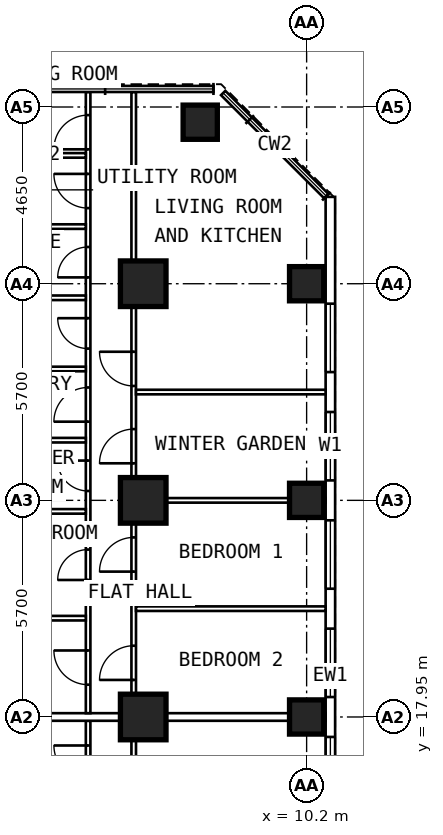
"""IFC4 building model, lengths in metres.
Left out: names, types, materials, properties, quantities, classifications, styles, units other than length and angle.
Written with IfcOpenShell. Run it as: python <this file> out.ifc"""

import sys

from ifc_helpers import new_model, si_unit, direction, frame, frame_2d, origin, origin_2d, place, context, subcontext, project, spatial, rectangle, extrude, element, fill, save


model = new_model("IFC4")
c1 = context("Model", 3, precision=1e-05, world=origin(), true_north=direction((0.0, 1.0)))
c2 = subcontext(c1, "Body", "Model", "MODEL_VIEW")
j1 = project(units=[si_unit("LENGTHUNIT", "METRE"), si_unit("PLANEANGLEUNIT", "RADIAN")], contexts=[c1])
p1 = place(None, origin())
s1 = spatial("IfcSite", under=j1, at=p1, CompositionType="ELEMENT")
p2 = place(p1, origin())
s2 = spatial("IfcBuilding", under=s1, at=p2, CompositionType="ELEMENT")
p3 = place(p2, frame((0.0, 0.0, 102.4)))
s3 = spatial("IfcBuildingStorey", under=s2, at=p3, CompositionType="ELEMENT", Elevation=102.4)
for number, where, z_axis, x_axis in (
    (1, (10.2, 17.95, 0.0), (0.0, 0.0, 1.0), (0.0, 1.0, 0.0)),
    (2, (10.2, 23.65, 0.0), (0.0, 0.0, 1.0), (0.0, 1.0, 0.0)),
    (3, (10.2, 29.35, 0.0), (0.0, 0.0, 1.0), (0.0, 1.0, 0.0)),
    (4, (7.4, 33.6, 0.0), (0.0, 0.0, 1.0), (0.0, 1.0, 0.0)),
):
    element("IfcColumn", number, at=place(p3, frame(where, z_axis=z_axis, x_axis=x_axis)), inside=s3, PredefinedType="COLUMN", context=c2, shape_type="SweptSolid", body=[
        extrude(rectangle(XDim=0.9, YDim=0.9, at=origin_2d()), origin(), (0.0, 0.0, 1.0), 3.6),
    ])
for number, where, z_axis, x_axis in (
    (5, (5.9, 17.95, 0.0), (0.0, 0.0, 1.0), (0.0, 1.0, 0.0)),
    (6, (5.9, 23.65, 0.0), (0.0, 0.0, 1.0), (0.0, 1.0, 0.0)),
    (7, (5.9, 29.35, 0.0), (0.0, 0.0, 1.0), (0.0, 1.0, 0.0)),
):
    element("IfcColumn", number, at=place(p3, frame(where, z_axis=z_axis, x_axis=x_axis)), inside=s3, PredefinedType="COLUMN", context=c2, shape_type="SweptSolid", body=[
        extrude(rectangle(XDim=1.2, YDim=1.2, at=origin_2d()), origin(), (0.0, 0.0, 1.0), 3.6),
    ])
p4 = place(p3, frame((10.825, 6.409, 0.0), z_axis=(0.0, 0.0, 1.0), x_axis=(0.0, 1.0, 0.0)))
e8 = element("IfcWall", 8, at=p4, inside=s3, PredefinedType="SOLIDWALL", context=c2, shape_type="SweptSolid", body=[
    extrude(rectangle(XDim=25.226, YDim=0.25, at=frame_2d((12.613, 0.0))), origin(), (0.0, 0.0, 1.0), 3.35),
])
p5 = place(p4, frame((0.666, 0.0, 0.8)))
e9 = element("IfcOpeningElement", 9, at=p5, cuts=e8, PredefinedType="OPENING", context=c2, shape_type="SweptSolid", body=[
    extrude(rectangle(XDim=1.8, YDim=1.8, at=frame_2d((0.9, 0.9))), frame((0.0, 0.137, 0.0), z_axis=(0.0, -1.0, 0.0), x_axis=(1.0, 0.0, 0.0)), (0.0, 0.0, 1.0), 0.274),
])
p6 = place(p4, frame((3.516, 0.0, 0.8)))
e10 = element("IfcOpeningElement", 10, at=p6, cuts=e8, PredefinedType="OPENING", context=c2, shape_type="SweptSolid", body=[
    extrude(rectangle(XDim=1.8, YDim=1.8, at=frame_2d((0.9, 0.9))), frame((0.0, 0.137, 0.0), z_axis=(0.0, -1.0, 0.0), x_axis=(1.0, 0.0, 0.0)), (0.0, 0.0, 1.0), 0.274),
])
p7 = place(p4, frame((6.366, 0.0, 0.8)))
e11 = element("IfcOpeningElement", 11, at=p7, cuts=e8, PredefinedType="OPENING", context=c2, shape_type="SweptSolid", body=[
    extrude(rectangle(XDim=1.8, YDim=1.8, at=frame_2d((0.9, 0.9))), frame((0.0, 0.137, 0.0), z_axis=(0.0, -1.0, 0.0), x_axis=(1.0, 0.0, 0.0)), (0.0, 0.0, 1.0), 0.274),
])
p8 = place(p4, frame((9.216, 0.0, 0.8)))
e12 = element("IfcOpeningElement", 12, at=p8, cuts=e8, PredefinedType="OPENING", context=c2, shape_type="SweptSolid", body=[
    extrude(rectangle(XDim=1.8, YDim=1.8, at=frame_2d((0.9, 0.9))), frame((0.0, 0.137, 0.0), z_axis=(0.0, -1.0, 0.0), x_axis=(1.0, 0.0, 0.0)), (0.0, 0.0, 1.0), 0.274),
])
p9 = place(p4, frame((12.066, 0.0, 0.8)))
e13 = element("IfcOpeningElement", 13, at=p9, cuts=e8, PredefinedType="OPENING", context=c2, shape_type="SweptSolid", body=[
    extrude(rectangle(XDim=1.8, YDim=1.8, at=frame_2d((0.9, 0.9))), frame((0.0, 0.137, 0.0), z_axis=(0.0, -1.0, 0.0), x_axis=(1.0, 0.0, 0.0)), (0.0, 0.0, 1.0), 0.274),
])
p10 = place(p4, frame((14.916, 0.0, 0.8)))
e14 = element("IfcOpeningElement", 14, at=p10, cuts=e8, PredefinedType="OPENING", context=c2, shape_type="SweptSolid", body=[
    extrude(rectangle(XDim=1.8, YDim=1.8, at=frame_2d((0.9, 0.9))), frame((0.0, 0.137, 0.0), z_axis=(0.0, -1.0, 0.0), x_axis=(1.0, 0.0, 0.0)), (0.0, 0.0, 1.0), 0.274),
])
p11 = place(p4, frame((17.766, 0.0, 0.8)))
e15 = element("IfcOpeningElement", 15, at=p11, cuts=e8, PredefinedType="OPENING", context=c2, shape_type="SweptSolid", body=[
    extrude(rectangle(XDim=1.8, YDim=1.8, at=frame_2d((0.9, 0.9))), frame((0.0, 0.137, 0.0), z_axis=(0.0, -1.0, 0.0), x_axis=(1.0, 0.0, 0.0)), (0.0, 0.0, 1.0), 0.274),
])
p12 = place(p4, frame((20.616, 0.0, 0.8)))
e16 = element("IfcOpeningElement", 16, at=p12, cuts=e8, PredefinedType="OPENING", context=c2, shape_type="SweptSolid", body=[
    extrude(rectangle(XDim=1.8, YDim=1.8, at=frame_2d((0.9, 0.9))), frame((0.0, 0.137, 0.0), z_axis=(0.0, -1.0, 0.0), x_axis=(1.0, 0.0, 0.0)), (0.0, 0.0, 1.0), 0.274),
])
p13 = place(p3, frame((4.45, 10.1, 0.0), z_axis=(0.0, 0.0, 1.0), x_axis=(0.0, 1.0, 0.0)))
e17 = element("IfcWall", 17, at=p13, inside=s3, PredefinedType="PARTITIONING", context=c2, shape_type="SweptSolid", body=[
    extrude(rectangle(XDim=7.75, YDim=0.12, at=frame_2d((3.875, 0.0))), origin(), (0.0, 0.0, 1.0), 3.35),
])
p14 = place(p13, frame((0.56, 0.0, 0.0)))
e18 = element("IfcOpeningElement", 18, at=p14, cuts=e17, PredefinedType="OPENING", context=c2, shape_type="SweptSolid", body=[
    extrude(rectangle(XDim=0.9, YDim=2.1, at=frame_2d((0.45, 1.05))), frame((0.0, 0.072, 0.0), z_axis=(0.0, -1.0, 0.0), x_axis=(1.0, 0.0, 0.0)), (0.0, 0.0, 1.0), 0.144),
])
p15 = place(p13, frame((3.385, 0.0, 0.0)))
e19 = element("IfcOpeningElement", 19, at=p15, cuts=e17, PredefinedType="OPENING", context=c2, shape_type="SweptSolid", body=[
    extrude(rectangle(XDim=0.8, YDim=2.1, at=frame_2d((0.4, 1.05))), frame((0.0, 0.072, 0.0), z_axis=(0.0, -1.0, 0.0), x_axis=(1.0, 0.0, 0.0)), (0.0, 0.0, 1.0), 0.144),
])
p16 = place(p13, frame((6.2, 0.0, 0.0)))
e20 = element("IfcOpeningElement", 20, at=p16, cuts=e17, PredefinedType="OPENING", context=c2, shape_type="SweptSolid", body=[
    extrude(rectangle(XDim=0.9, YDim=2.1, at=frame_2d((0.45, 1.05))), frame((0.0, 0.072, 0.0), z_axis=(0.0, -1.0, 0.0), x_axis=(1.0, 0.0, 0.0)), (0.0, 0.0, 1.0), 0.144),
])
p17 = place(p3, frame((5.65, 9.6, 0.0), z_axis=(0.0, 0.0, 1.0), x_axis=(0.0, 1.0, 0.0)))
e21 = element("IfcWall", 21, at=p17, inside=s3, PredefinedType="PARTITIONING", context=c2, shape_type="SweptSolid", body=[
    extrude(rectangle(XDim=8.1, YDim=0.12, at=frame_2d((4.05, 0.0))), origin(), (0.0, 0.0, 1.0), 3.35),
])
p18 = place(p17, frame((5.05, 0.0, 0.0)))
e22 = element("IfcOpeningElement", 22, at=p18, cuts=e21, PredefinedType="OPENING", context=c2, shape_type="SweptSolid", body=[
    extrude(rectangle(XDim=0.9, YDim=2.1, at=frame_2d((0.45, 1.05))), frame((0.0, 0.072, 0.0), z_axis=(0.0, -1.0, 0.0), x_axis=(1.0, 0.0, 0.0)), (0.0, 0.0, 1.0), 0.144),
])
p19 = place(p3, frame((4.45, 18.05, 0.0), z_axis=(0.0, 0.0, 1.0), x_axis=(0.0, 1.0, 0.0)))
e23 = element("IfcWall", 23, at=p19, inside=s3, PredefinedType="PARTITIONING", context=c2, shape_type="SweptSolid", body=[
    extrude(rectangle(XDim=16.345, YDim=0.12, at=frame_2d((8.172, 0.0))), origin(), (0.0, 0.0, 1.0), 3.35),
])
p20 = place(p19, frame((0.75, 0.0, 0.0)))
e24 = element("IfcOpeningElement", 24, at=p20, cuts=e23, PredefinedType="OPENING", context=c2, shape_type="SweptSolid", body=[
    extrude(rectangle(XDim=0.9, YDim=2.1, at=frame_2d((0.45, 1.05))), frame((0.0, 0.072, 0.0), z_axis=(0.0, -1.0, 0.0), x_axis=(1.0, 0.0, 0.0)), (0.0, 0.0, 1.0), 0.144),
])
p21 = place(p19, frame((3.505, 0.0, 0.0)))
e25 = element("IfcOpeningElement", 25, at=p21, cuts=e23, PredefinedType="OPENING", context=c2, shape_type="SweptSolid", body=[
    extrude(rectangle(XDim=0.8, YDim=2.1, at=frame_2d((0.4, 1.05))), frame((0.0, 0.072, 0.0), z_axis=(0.0, -1.0, 0.0), x_axis=(1.0, 0.0, 0.0)), (0.0, 0.0, 1.0), 0.144),
])
p22 = place(p19, frame((5.847, 0.0, 0.0)))
e26 = element("IfcOpeningElement", 26, at=p22, cuts=e23, PredefinedType="OPENING", context=c2, shape_type="SweptSolid", body=[
    extrude(rectangle(XDim=0.8, YDim=2.1, at=frame_2d((0.4, 1.05))), frame((0.0, 0.072, 0.0), z_axis=(0.0, -1.0, 0.0), x_axis=(1.0, 0.0, 0.0)), (0.0, 0.0, 1.0), 0.144),
])
p23 = place(p19, frame((7.67, 0.0, 0.0)))
e27 = element("IfcOpeningElement", 27, at=p23, cuts=e23, PredefinedType="OPENING", context=c2, shape_type="SweptSolid", body=[
    extrude(rectangle(XDim=0.9, YDim=2.1, at=frame_2d((0.45, 1.05))), frame((0.0, 0.072, 0.0), z_axis=(0.0, -1.0, 0.0), x_axis=(1.0, 0.0, 0.0)), (0.0, 0.0, 1.0), 0.144),
])
p24 = place(p19, frame((9.593, 0.0, 0.0)))
e28 = element("IfcOpeningElement", 28, at=p24, cuts=e23, PredefinedType="OPENING", context=c2, shape_type="SweptSolid", body=[
    extrude(rectangle(XDim=0.8, YDim=2.1, at=frame_2d((0.4, 1.05))), frame((0.0, 0.072, 0.0), z_axis=(0.0, -1.0, 0.0), x_axis=(1.0, 0.0, 0.0)), (0.0, 0.0, 1.0), 0.144),
])
p25 = place(p19, frame((11.467, 0.0, 0.0)))
e29 = element("IfcOpeningElement", 29, at=p25, cuts=e23, PredefinedType="OPENING", context=c2, shape_type="SweptSolid", body=[
    extrude(rectangle(XDim=0.8, YDim=2.1, at=frame_2d((0.4, 1.05))), frame((0.0, 0.072, 0.0), z_axis=(0.0, -1.0, 0.0), x_axis=(1.0, 0.0, 0.0)), (0.0, 0.0, 1.0), 0.144),
])
p26 = place(p19, frame((13.29, 0.0, 0.0)))
e30 = element("IfcOpeningElement", 30, at=p26, cuts=e23, PredefinedType="OPENING", context=c2, shape_type="SweptSolid", body=[
    extrude(rectangle(XDim=0.9, YDim=2.1, at=frame_2d((0.45, 1.05))), frame((0.0, 0.072, 0.0), z_axis=(0.0, -1.0, 0.0), x_axis=(1.0, 0.0, 0.0)), (0.0, 0.0, 1.0), 0.144),
])
p27 = place(p19, frame((14.837, 0.0, 0.0)))
e31 = element("IfcOpeningElement", 31, at=p27, cuts=e23, PredefinedType="OPENING", context=c2, shape_type="SweptSolid", body=[
    extrude(rectangle(XDim=0.9, YDim=2.1, at=frame_2d((0.45, 1.05))), frame((0.0, 0.072, 0.0), z_axis=(0.0, -1.0, 0.0), x_axis=(1.0, 0.0, 0.0)), (0.0, 0.0, 1.0), 0.144),
])
p28 = place(p3, frame((5.65, 18.05, 0.0), z_axis=(0.0, 0.0, 1.0), x_axis=(0.0, 1.0, 0.0)))
e32 = element("IfcWall", 32, at=p28, inside=s3, PredefinedType="PARTITIONING", context=c2, shape_type="SweptSolid", body=[
    extrude(rectangle(XDim=16.345, YDim=0.12, at=frame_2d((8.172, 0.0))), origin(), (0.0, 0.0, 1.0), 3.35),
])
p29 = place(p28, frame((0.875, 0.0, 0.0)))
e33 = element("IfcOpeningElement", 33, at=p29, cuts=e32, PredefinedType="OPENING", context=c2, shape_type="SweptSolid", body=[
    extrude(rectangle(XDim=0.9, YDim=2.1, at=frame_2d((0.45, 1.05))), frame((0.0, 0.072, 0.0), z_axis=(0.0, -1.0, 0.0), x_axis=(1.0, 0.0, 0.0)), (0.0, 0.0, 1.0), 0.144),
])
p30 = place(p28, frame((3.725, 0.0, 0.0)))
e34 = element("IfcOpeningElement", 34, at=p30, cuts=e32, PredefinedType="OPENING", context=c2, shape_type="SweptSolid", body=[
    extrude(rectangle(XDim=0.9, YDim=2.1, at=frame_2d((0.45, 1.05))), frame((0.0, 0.072, 0.0), z_axis=(0.0, -1.0, 0.0), x_axis=(1.0, 0.0, 0.0)), (0.0, 0.0, 1.0), 0.144),
])
p31 = place(p28, frame((6.575, 0.0, 0.0)))
e35 = element("IfcOpeningElement", 35, at=p31, cuts=e32, PredefinedType="OPENING", context=c2, shape_type="SweptSolid", body=[
    extrude(rectangle(XDim=0.9, YDim=2.1, at=frame_2d((0.45, 1.05))), frame((0.0, 0.072, 0.0), z_axis=(0.0, -1.0, 0.0), x_axis=(1.0, 0.0, 0.0)), (0.0, 0.0, 1.0), 0.144),
])
p32 = place(p28, frame((8.61, 0.0, 0.0)))
e36 = element("IfcOpeningElement", 36, at=p32, cuts=e32, PredefinedType="OPENING", context=c2, shape_type="SweptSolid", body=[
    extrude(rectangle(XDim=0.9, YDim=2.1, at=frame_2d((0.45, 1.05))), frame((0.0, 0.072, 0.0), z_axis=(0.0, -1.0, 0.0), x_axis=(1.0, 0.0, 0.0)), (0.0, 0.0, 1.0), 0.144),
])
p33 = place(p3, frame((5.71, 20.8, 0.0), z_axis=(0.0, 0.0, 1.0), x_axis=(1.0, 0.0, 0.0)))
e37 = element("IfcWall", 37, at=p33, inside=s3, PredefinedType="PARTITIONING", context=c2, shape_type="SweptSolid", body=[
    extrude(rectangle(XDim=4.99, YDim=0.12, at=frame_2d((2.495, 0.0))), origin(), (0.0, 0.0, 1.0), 3.35),
])
p34 = place(p3, frame((5.71, 23.65, 0.0), z_axis=(0.0, 0.0, 1.0), x_axis=(1.0, 0.0, 0.0)))
e38 = element("IfcWall", 38, at=p34, inside=s3, PredefinedType="PARTITIONING", context=c2, shape_type="SweptSolid", body=[
    extrude(rectangle(XDim=4.99, YDim=0.12, at=frame_2d((2.495, 0.0))), origin(), (0.0, 0.0, 1.0), 2.45),
])
p35 = place(p3, frame((5.71, 26.5, 0.0), z_axis=(0.0, 0.0, 1.0), x_axis=(1.0, 0.0, 0.0)))
e39 = element("IfcWall", 39, at=p35, inside=s3, PredefinedType="PARTITIONING", context=c2, shape_type="SweptSolid", body=[
    extrude(rectangle(XDim=4.99, YDim=0.12, at=frame_2d((2.495, 0.0))), origin(), (0.0, 0.0, 1.0), 3.35),
])
p36 = place(p3, frame((2.1, 20.55, 0.0), z_axis=(0.0, 0.0, 1.0), x_axis=(1.0, 0.0, 0.0)))
e40 = element("IfcWall", 40, at=p36, inside=s3, PredefinedType="PARTITIONING", context=c2, shape_type="SweptSolid", body=[
    extrude(rectangle(XDim=2.29, YDim=0.12, at=frame_2d((1.145, 0.0))), origin(), (0.0, 0.0, 1.0), 3.35),
])
p37 = place(p3, frame((2.1, 23.36, 0.0), z_axis=(0.0, 0.0, 1.0), x_axis=(1.0, 0.0, 0.0)))
e41 = element("IfcWall", 41, at=p37, inside=s3, PredefinedType="PARTITIONING", context=c2, shape_type="SweptSolid", body=[
    extrude(rectangle(XDim=2.29, YDim=0.12, at=frame_2d((1.145, 0.0))), origin(), (0.0, 0.0, 1.0), 2.45),
])
for number, where, z_axis, x_axis in (
    (42, (2.1, 25.233, 0.0), (0.0, 0.0, 1.0), (1.0, 0.0, 0.0)),
    (43, (2.1, 27.107, 0.0), (0.0, 0.0, 1.0), (1.0, 0.0, 0.0)),
):
    element("IfcWall", number, at=place(p3, frame(where, z_axis=z_axis, x_axis=x_axis)), inside=s3, PredefinedType="PARTITIONING", context=c2, shape_type="SweptSolid", body=[
        extrude(rectangle(XDim=2.29, YDim=0.12, at=frame_2d((1.145, 0.0))), origin(), (0.0, 0.0, 1.0), 3.35),
    ])
p38 = place(p3, frame((2.1, 28.98, 0.0), z_axis=(0.0, 0.0, 1.0), x_axis=(1.0, 0.0, 0.0)))
e44 = element("IfcWall", 44, at=p38, inside=s3, PredefinedType="PARTITIONING", context=c2, shape_type="SweptSolid", body=[
    extrude(rectangle(XDim=2.29, YDim=0.12, at=frame_2d((1.145, 0.0))), origin(), (0.0, 0.0, 1.0), 2.45),
])
for number, where, z_axis, x_axis in (
    (45, (2.1, 30.853, 0.0), (0.0, 0.0, 1.0), (1.0, 0.0, 0.0)),
    (46, (2.1, 32.727, 0.0), (0.0, 0.0, 1.0), (1.0, 0.0, 0.0)),
):
    element("IfcWall", number, at=place(p3, frame(where, z_axis=z_axis, x_axis=x_axis)), inside=s3, PredefinedType="PARTITIONING", context=c2, shape_type="SweptSolid", body=[
        extrude(rectangle(XDim=2.29, YDim=0.12, at=frame_2d((1.145, 0.0))), origin(), (0.0, 0.0, 1.0), 3.35),
    ])
p39 = place(p3, frame((2.1, 17.95, 0.0), z_axis=(0.0, 0.0, 1.0), x_axis=(1.0, 0.0, 0.0)))
e47 = element("IfcWall", 47, at=p39, inside=s3, PredefinedType="PARTITIONING", context=c2, shape_type="SweptSolid", body=[
    extrude(rectangle(XDim=8.6, YDim=0.2, at=frame_2d((4.3, 0.0))), origin(), (0.0, 0.0, 1.0), 2.45),
])
p40 = place(p8, origin())
e48 = element("IfcWindow", 48, at=p40, inside=s3, PartitioningType="SINGLE_PANEL", PredefinedType="WINDOW", context=c2, shape_type="SweptSolid", body=[
    extrude(rectangle(XDim=1.8, YDim=1.8, at=frame_2d((0.9, 0.9))), frame((0.0, 0.03, 0.0), z_axis=(0.0, -1.0, 0.0), x_axis=(1.0, 0.0, 0.0)), (0.0, 0.0, 1.0), 0.06),
])
fill(e12, e48)
p41 = place(p9, origin())
e49 = element("IfcWindow", 49, at=p41, inside=s3, PartitioningType="SINGLE_PANEL", PredefinedType="WINDOW", context=c2, shape_type="SweptSolid", body=[
    extrude(rectangle(XDim=1.8, YDim=1.8, at=frame_2d((0.9, 0.9))), frame((0.0, 0.03, 0.0), z_axis=(0.0, -1.0, 0.0), x_axis=(1.0, 0.0, 0.0)), (0.0, 0.0, 1.0), 0.06),
])
fill(e13, e49)
p42 = place(p10, origin())
e50 = element("IfcWindow", 50, at=p42, inside=s3, PartitioningType="SINGLE_PANEL", PredefinedType="WINDOW", context=c2, shape_type="SweptSolid", body=[
    extrude(rectangle(XDim=1.8, YDim=1.8, at=frame_2d((0.9, 0.9))), frame((0.0, 0.03, 0.0), z_axis=(0.0, -1.0, 0.0), x_axis=(1.0, 0.0, 0.0)), (0.0, 0.0, 1.0), 0.06),
])
fill(e14, e50)
p43 = place(p11, origin())
e51 = element("IfcWindow", 51, at=p43, inside=s3, PartitioningType="SINGLE_PANEL", PredefinedType="WINDOW", context=c2, shape_type="SweptSolid", body=[
    extrude(rectangle(XDim=1.8, YDim=1.8, at=frame_2d((0.9, 0.9))), frame((0.0, 0.03, 0.0), z_axis=(0.0, -1.0, 0.0), x_axis=(1.0, 0.0, 0.0)), (0.0, 0.0, 1.0), 0.06),
])
fill(e15, e51)
p44 = place(p12, origin())
e52 = element("IfcWindow", 52, at=p44, inside=s3, PartitioningType="SINGLE_PANEL", PredefinedType="WINDOW", context=c2, shape_type="SweptSolid", body=[
    extrude(rectangle(XDim=1.8, YDim=1.8, at=frame_2d((0.9, 0.9))), frame((0.0, 0.03, 0.0), z_axis=(0.0, -1.0, 0.0), x_axis=(1.0, 0.0, 0.0)), (0.0, 0.0, 1.0), 0.06),
])
fill(e16, e52)
p45 = place(p16, origin())
e53 = element("IfcDoor", 53, at=p45, inside=s3, OperationType="SINGLE_SWING_RIGHT", PredefinedType="DOOR", context=c2, shape_type="SweptSolid", body=[
    extrude(rectangle(XDim=0.9, YDim=2.1, at=frame_2d((0.45, 1.05))), frame((0.0, 0.025, 0.0), z_axis=(0.0, -1.0, 0.0), x_axis=(1.0, 0.0, 0.0)), (0.0, 0.0, 1.0), 0.05),
])
fill(e20, e53)
p46 = place(p29, origin())
e54 = element("IfcDoor", 54, at=p46, inside=s3, OperationType="SINGLE_SWING_LEFT", PredefinedType="DOOR", context=c2, shape_type="SweptSolid", body=[
    extrude(rectangle(XDim=0.9, YDim=2.1, at=frame_2d((0.45, 1.05))), frame((0.0, 0.025, 0.0), z_axis=(0.0, -1.0, 0.0), x_axis=(1.0, 0.0, 0.0)), (0.0, 0.0, 1.0), 0.05),
])
fill(e33, e54)
p47 = place(p30, origin())
e55 = element("IfcDoor", 55, at=p47, inside=s3, OperationType="SINGLE_SWING_LEFT", PredefinedType="DOOR", context=c2, shape_type="SweptSolid", body=[
    extrude(rectangle(XDim=0.9, YDim=2.1, at=frame_2d((0.45, 1.05))), frame((0.0, 0.025, 0.0), z_axis=(0.0, -1.0, 0.0), x_axis=(1.0, 0.0, 0.0)), (0.0, 0.0, 1.0), 0.05),
])
fill(e34, e55)
p48 = place(p31, origin())
e56 = element("IfcDoor", 56, at=p48, inside=s3, OperationType="SINGLE_SWING_LEFT", PredefinedType="DOOR", context=c2, shape_type="SweptSolid", body=[
    extrude(rectangle(XDim=0.9, YDim=2.1, at=frame_2d((0.45, 1.05))), frame((0.0, 0.025, 0.0), z_axis=(0.0, -1.0, 0.0), x_axis=(1.0, 0.0, 0.0)), (0.0, 0.0, 1.0), 0.05),
])
fill(e35, e56)
p49 = place(p32, origin())
e57 = element("IfcDoor", 57, at=p49, inside=s3, OperationType="SINGLE_SWING_RIGHT", PredefinedType="DOOR", context=c2, shape_type="SweptSolid", body=[
    extrude(rectangle(XDim=0.9, YDim=2.1, at=frame_2d((0.45, 1.05))), frame((0.0, 0.025, 0.0), z_axis=(0.0, -1.0, 0.0), x_axis=(1.0, 0.0, 0.0)), (0.0, 0.0, 1.0), 0.05),
])
fill(e36, e57)
p50 = place(p20, origin())
e58 = element("IfcDoor", 58, at=p50, inside=s3, OperationType="SINGLE_SWING_RIGHT", PredefinedType="DOOR", context=c2, shape_type="SweptSolid", body=[
    extrude(rectangle(XDim=0.9, YDim=2.1, at=frame_2d((0.45, 1.05))), frame((0.0, 0.025, 0.0), z_axis=(0.0, -1.0, 0.0), x_axis=(1.0, 0.0, 0.0)), (0.0, 0.0, 1.0), 0.05),
])
fill(e24, e58)
p51 = place(p21, origin())
e59 = element("IfcDoor", 59, at=p51, inside=s3, OperationType="SINGLE_SWING_LEFT", PredefinedType="DOOR", context=c2, shape_type="SweptSolid", body=[
    extrude(rectangle(XDim=0.8, YDim=2.1, at=frame_2d((0.4, 1.05))), frame((0.0, 0.025, 0.0), z_axis=(0.0, -1.0, 0.0), x_axis=(1.0, 0.0, 0.0)), (0.0, 0.0, 1.0), 0.05),
])
fill(e25, e59)
p52 = place(p22, origin())
e60 = element("IfcDoor", 60, at=p52, inside=s3, OperationType="SINGLE_SWING_RIGHT", PredefinedType="DOOR", context=c2, shape_type="SweptSolid", body=[
    extrude(rectangle(XDim=0.8, YDim=2.1, at=frame_2d((0.4, 1.05))), frame((0.0, 0.025, 0.0), z_axis=(0.0, -1.0, 0.0), x_axis=(1.0, 0.0, 0.0)), (0.0, 0.0, 1.0), 0.05),
])
fill(e26, e60)
p53 = place(p23, origin())
e61 = element("IfcDoor", 61, at=p53, inside=s3, OperationType="SINGLE_SWING_LEFT", PredefinedType="DOOR", context=c2, shape_type="SweptSolid", body=[
    extrude(rectangle(XDim=0.9, YDim=2.1, at=frame_2d((0.45, 1.05))), frame((0.0, 0.025, 0.0), z_axis=(0.0, -1.0, 0.0), x_axis=(1.0, 0.0, 0.0)), (0.0, 0.0, 1.0), 0.05),
])
fill(e27, e61)
p54 = place(p24, origin())
e62 = element("IfcDoor", 62, at=p54, inside=s3, OperationType="SINGLE_SWING_RIGHT", PredefinedType="DOOR", context=c2, shape_type="SweptSolid", body=[
    extrude(rectangle(XDim=0.8, YDim=2.1, at=frame_2d((0.4, 1.05))), frame((0.0, 0.025, 0.0), z_axis=(0.0, -1.0, 0.0), x_axis=(1.0, 0.0, 0.0)), (0.0, 0.0, 1.0), 0.05),
])
fill(e28, e62)
p55 = place(p25, origin())
e63 = element("IfcDoor", 63, at=p55, inside=s3, OperationType="SINGLE_SWING_LEFT", PredefinedType="DOOR", context=c2, shape_type="SweptSolid", body=[
    extrude(rectangle(XDim=0.8, YDim=2.1, at=frame_2d((0.4, 1.05))), frame((0.0, 0.025, 0.0), z_axis=(0.0, -1.0, 0.0), x_axis=(1.0, 0.0, 0.0)), (0.0, 0.0, 1.0), 0.05),
])
fill(e29, e63)
p56 = place(p26, origin())
e64 = element("IfcDoor", 64, at=p56, inside=s3, OperationType="SINGLE_SWING_RIGHT", PredefinedType="DOOR", context=c2, shape_type="SweptSolid", body=[
    extrude(rectangle(XDim=0.9, YDim=2.1, at=frame_2d((0.45, 1.05))), frame((0.0, 0.025, 0.0), z_axis=(0.0, -1.0, 0.0), x_axis=(1.0, 0.0, 0.0)), (0.0, 0.0, 1.0), 0.05),
])
fill(e30, e64)
p57 = place(p27, origin())
e65 = element("IfcDoor", 65, at=p57, inside=s3, OperationType="SINGLE_SWING_LEFT", PredefinedType="DOOR", context=c2, shape_type="SweptSolid", body=[
    extrude(rectangle(XDim=0.9, YDim=2.1, at=frame_2d((0.45, 1.05))), frame((0.0, 0.025, 0.0), z_axis=(0.0, -1.0, 0.0), x_axis=(1.0, 0.0, 0.0)), (0.0, 0.0, 1.0), 0.05),
])
fill(e31, e65)
save(model, sys.argv[1])
